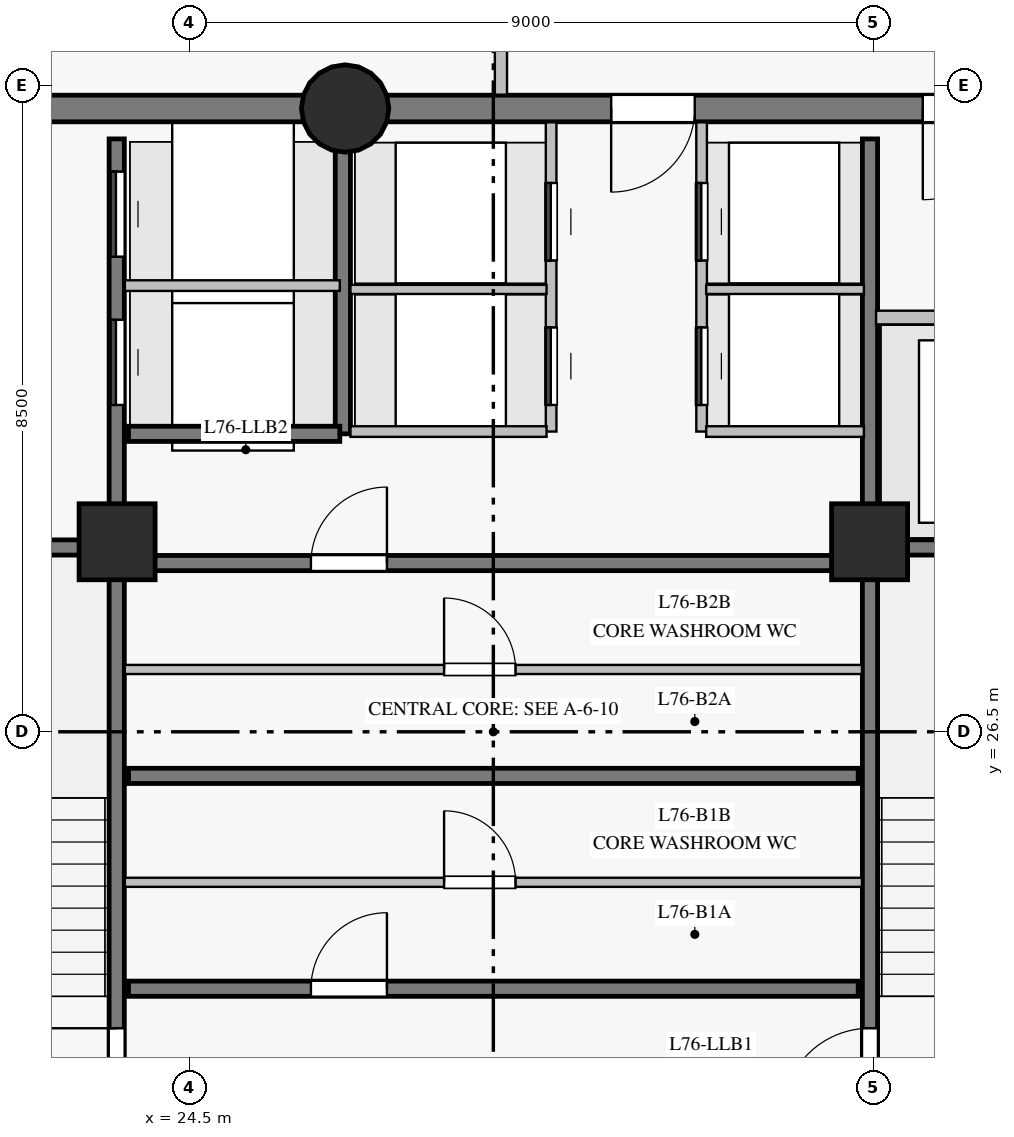
"""IFC4 building model, lengths in metres.
Left out: names, types, materials, properties, quantities, classifications, styles, units other than length and angle.
Written with IfcOpenShell. Run it as: python <this file> out.ifc"""

import sys

from ifc_helpers import new_model, si_unit, direction, frame, frame_2d, origin, origin_with_axes, origin_2d, place, context, subcontext, project, spatial, rectangle, circle, extrude, source, transform, mapped, element, fill, save


model = new_model("IFC4")
c1 = context("Model", 3, precision=1e-05, world=origin(), true_north=direction((0.0, 1.0)))
c2 = subcontext(c1, "Body", "Model", "MODEL_VIEW")
j1 = project(units=[si_unit("LENGTHUNIT", "METRE"), si_unit("PLANEANGLEUNIT", "RADIAN")], contexts=[c1])
p1 = place(None, origin())
s1 = spatial("IfcSite", under=j1, at=p1, CompositionType="ELEMENT")
p2 = place(p1, origin())
s2 = spatial("IfcBuilding", under=s1, at=p2, CompositionType="ELEMENT")
p3 = place(p2, frame((0.0, 0.0, 256.55)))
s3 = spatial("IfcBuildingStorey", under=s2, at=p3, CompositionType="ELEMENT", Elevation=256.55)
p4 = place(p3, frame((37.5, 34.7, 0.0), z_axis=(0.0, 0.0, 1.0), x_axis=(-1.0, 0.0, 0.0)))
e1 = element("IfcWall", 1, at=p4, inside=s3, PredefinedType="SHEAR", context=c2, shape_type="SweptSolid", body=[
    extrude(rectangle(XDim=10.95, YDim=0.35, at=frame_2d((5.475, 0.0))), origin(), (0.0, 0.0, 1.0), 2.85),
])
p5 = place(p4, frame((2.15, 0.0, 0.0)))
e2 = element("IfcOpeningElement", 2, at=p5, cuts=e1, PredefinedType="OPENING", context=c2, shape_type="SweptSolid", body=[
    extrude(rectangle(XDim=1.2, YDim=2.15, at=frame_2d((0.6, 1.075))), frame((0.0, 0.185, 0.0), z_axis=(0.0, -1.0, 0.0), x_axis=(1.0, 0.0, 0.0)), (0.0, 0.0, 1.0), 0.37),
])
p6 = place(p4, frame((6.35, 0.0, 0.0)))
e3 = element("IfcOpeningElement", 3, at=p6, cuts=e1, PredefinedType="OPENING", context=c2, shape_type="SweptSolid", body=[
    extrude(rectangle(XDim=1.1, YDim=2.15, at=frame_2d((0.55, 1.075))), frame((0.0, 0.185, 0.0), z_axis=(0.0, -1.0, 0.0), x_axis=(1.0, 0.0, 0.0)), (0.0, 0.0, 1.0), 0.37),
])
p7 = place(p3, frame((26.55, 34.7, 0.0), z_axis=(0.0, 0.0, 1.0), x_axis=(-1.0, 0.0, 0.0)))
e4 = element("IfcWall", 4, at=p7, inside=s3, PredefinedType="SHEAR", context=c2, shape_type="SweptSolid", body=[
    extrude(rectangle(XDim=7.05, YDim=0.35, at=frame_2d((3.525, 0.0))), origin(), (0.0, 0.0, 1.0), 2.85),
])
m1 = source(origin_with_axes(), c2, "Body", "SweptSolid", [
    extrude(circle(Radius=0.575, at=origin_2d()), origin(), (0.0, 0.0, 1.0), 3.05),
])
p8 = place(p3, frame((26.55, 34.7, 0.0), z_axis=(0.0, 0.0, 1.0), x_axis=(1.0, 0.0, 0.0)))
e5 = element("IfcColumn", 5, at=p8, inside=s3, PredefinedType="COLUMN", context=c2, shape_type="MappedRepresentation", body=[
    mapped(m1, transform((0.0, 0.0, 0.0), scale=1.0)),
])
m2 = source(origin_with_axes(), c2, "Body", "SweptSolid", [
    extrude(rectangle(XDim=1.0, YDim=1.0, at=origin_2d()), origin(), (0.0, 0.0, 1.0), 3.05),
])
for number, where, z_axis, x_axis in (
    (6, (23.55, 29.0, 0.0), (0.0, 0.0, 1.0), (1.0, 0.0, 0.0)),
    (7, (33.45, 29.0, 0.0), (0.0, 0.0, 1.0), (1.0, 0.0, 0.0)),
):
    element("IfcColumn", number, at=place(p3, frame(where, z_axis=z_axis, x_axis=x_axis)), inside=s3, PredefinedType="COLUMN", context=c2, shape_type="MappedRepresentation", body=[
        mapped(m2, transform((0.0, 0.0, 0.0), scale=1.0)),
    ])
p9 = place(p3, frame((23.545, 18.7, 0.0), z_axis=(0.0, 0.0, 1.0), x_axis=(0.0, 1.0, 0.0)))
e8 = element("IfcWall", 8, at=p9, inside=s3, PredefinedType="SHEAR", context=c2, shape_type="SweptSolid", body=[
    extrude(rectangle(XDim=15.6, YDim=0.2, at=frame_2d((7.8, 0.0))), origin(), (0.0, 0.0, 1.0), 2.85),
])
p10 = place(p9, frame((2.75, 0.0, 0.0)))
e9 = element("IfcOpeningElement", 9, at=p10, cuts=e8, PredefinedType="OPENING", context=c2, shape_type="SweptSolid", body=[
    extrude(rectangle(XDim=1.15, YDim=2.15, at=frame_2d((0.575, 1.075))), frame((0.0, 0.11, 0.0), z_axis=(0.0, -1.0, 0.0), x_axis=(1.0, 0.0, 0.0)), (0.0, 0.0, 1.0), 0.22),
])
p11 = place(p9, frame((0.14, 0.0, 0.0)))
e10 = element("IfcOpeningElement", 10, at=p11, cuts=e8, PredefinedType="OPENING", context=c2, shape_type="SweptSolid", body=[
    extrude(rectangle(XDim=0.88, YDim=2.1, at=frame_2d((0.44, 1.05))), frame((0.0, 0.11, 0.0), z_axis=(0.0, -1.0, 0.0), x_axis=(1.0, 0.0, 0.0)), (0.0, 0.0, 1.0), 0.22),
])
p12 = place(p9, frame((1.36, 0.0, 0.0)))
e11 = element("IfcOpeningElement", 11, at=p12, cuts=e8, PredefinedType="OPENING", context=c2, shape_type="SweptSolid", body=[
    extrude(rectangle(XDim=0.88, YDim=2.1, at=frame_2d((0.44, 1.05))), frame((0.0, 0.11, 0.0), z_axis=(0.0, -1.0, 0.0), x_axis=(1.0, 0.0, 0.0)), (0.0, 0.0, 1.0), 0.22),
])
p13 = place(p9, frame((12.1, 0.0, 0.0)))
e12 = element("IfcOpeningElement", 12, at=p13, cuts=e8, PredefinedType="OPENING", context=c2, shape_type="SweptSolid", body=[
    extrude(rectangle(XDim=1.12, YDim=2.15, at=frame_2d((0.56, 1.075))), frame((0.0, 0.11, 0.0), z_axis=(0.0, -1.0, 0.0), x_axis=(1.0, 0.0, 0.0)), (0.0, 0.0, 1.0), 0.22),
])
p14 = place(p9, frame((14.05, 0.0, 0.0)))
e13 = element("IfcOpeningElement", 13, at=p14, cuts=e8, PredefinedType="OPENING", context=c2, shape_type="SweptSolid", body=[
    extrude(rectangle(XDim=1.12, YDim=2.15, at=frame_2d((0.56, 1.075))), frame((0.0, 0.11, 0.0), z_axis=(0.0, -1.0, 0.0), x_axis=(1.0, 0.0, 0.0)), (0.0, 0.0, 1.0), 0.22),
])
p15 = place(p3, frame((33.455, 18.7, 0.0), z_axis=(0.0, 0.0, 1.0), x_axis=(0.0, 1.0, 0.0)))
e14 = element("IfcWall", 14, at=p15, inside=s3, PredefinedType="SHEAR", context=c2, shape_type="SweptSolid", body=[
    extrude(rectangle(XDim=15.6, YDim=0.2, at=frame_2d((7.8, 0.0))), origin(), (0.0, 0.0, 1.0), 2.85),
])
p16 = place(p15, frame((2.75, 0.0, 0.0)))
e15 = element("IfcOpeningElement", 15, at=p16, cuts=e14, PredefinedType="OPENING", context=c2, shape_type="SweptSolid", body=[
    extrude(rectangle(XDim=1.15, YDim=2.15, at=frame_2d((0.575, 1.075))), frame((0.0, 0.11, 0.0), z_axis=(0.0, -1.0, 0.0), x_axis=(1.0, 0.0, 0.0)), (0.0, 0.0, 1.0), 0.22),
])
p17 = place(p15, frame((0.55, 0.0, 0.0)))
e16 = element("IfcOpeningElement", 16, at=p17, cuts=e14, PredefinedType="OPENING", context=c2, shape_type="SweptSolid", body=[
    extrude(rectangle(XDim=0.94, YDim=2.1, at=frame_2d((0.47, 1.05))), frame((0.0, 0.11, 0.0), z_axis=(0.0, -1.0, 0.0), x_axis=(1.0, 0.0, 0.0)), (0.0, 0.0, 1.0), 0.22),
])
p18 = place(p3, frame((23.7, 23.12, 0.0), z_axis=(0.0, 0.0, 1.0), x_axis=(1.0, 0.0, 0.0)))
e17 = element("IfcWall", 17, at=p18, inside=s3, PredefinedType="SHEAR", context=c2, shape_type="SweptSolid", body=[
    extrude(rectangle(XDim=9.6, YDim=0.2, at=frame_2d((4.8, 0.0))), origin(), (0.0, 0.0, 1.0), 2.85),
])
p19 = place(p18, frame((2.4, 0.0, 0.0)))
e18 = element("IfcOpeningElement", 18, at=p19, cuts=e17, PredefinedType="OPENING", context=c2, shape_type="SweptSolid", body=[
    extrude(rectangle(XDim=1.0, YDim=2.15, at=frame_2d((0.5, 1.075))), frame((0.0, 0.11, 0.0), z_axis=(0.0, -1.0, 0.0), x_axis=(1.0, 0.0, 0.0)), (0.0, 0.0, 1.0), 0.22),
])
p20 = place(p3, frame((23.7, 25.92, 0.0), z_axis=(0.0, 0.0, 1.0), x_axis=(1.0, 0.0, 0.0)))
e19 = element("IfcWall", 19, at=p20, inside=s3, PredefinedType="SHEAR", context=c2, shape_type="SweptSolid", body=[
    extrude(rectangle(XDim=9.6, YDim=0.2, at=frame_2d((4.8, 0.0))), origin(), (0.0, 0.0, 1.0), 2.85),
])
p21 = place(p3, frame((23.7, 28.72, 0.0), z_axis=(0.0, 0.0, 1.0), x_axis=(1.0, 0.0, 0.0)))
e20 = element("IfcWall", 20, at=p21, inside=s3, PredefinedType="SHEAR", context=c2, shape_type="SweptSolid", body=[
    extrude(rectangle(XDim=9.6, YDim=0.2, at=frame_2d((4.8, 0.0))), origin(), (0.0, 0.0, 1.0), 2.85),
])
p22 = place(p21, frame((2.4, 0.0, 0.0)))
e21 = element("IfcOpeningElement", 21, at=p22, cuts=e20, PredefinedType="OPENING", context=c2, shape_type="SweptSolid", body=[
    extrude(rectangle(XDim=1.0, YDim=2.15, at=frame_2d((0.5, 1.075))), frame((0.0, 0.11, 0.0), z_axis=(0.0, -1.0, 0.0), x_axis=(1.0, 0.0, 0.0)), (0.0, 0.0, 1.0), 0.22),
])
for number, where, z_axis, x_axis in (
    (22, (33.455, 28.925, 0.0), (0.0, 0.0, 1.0), (1.0, 0.0, 0.0)),
    (23, (19.55, 28.925, 0.0), (0.0, 0.0, 1.0), (1.0, 0.0, 0.0)),
):
    element("IfcWall", number, at=place(p3, frame(where, z_axis=z_axis, x_axis=x_axis)), inside=s3, PredefinedType="SHEAR", context=c2, shape_type="SweptSolid", body=[
        extrude(rectangle(XDim=3.995, YDim=0.2, at=frame_2d((1.998, 0.0))), origin(), (0.0, 0.0, 1.0), 2.85),
    ])
p23 = place(p3, frame((26.52, 30.42, 0.0), z_axis=(0.0, 0.0, 1.0), x_axis=(0.0, 1.0, 0.0)))
e24 = element("IfcWall", 24, at=p23, inside=s3, PredefinedType="SHEAR", context=c2, shape_type="SweptSolid", body=[
    extrude(rectangle(XDim=3.86, YDim=0.2, at=frame_2d((1.93, 0.0))), origin(), (0.0, 0.0, 1.0), 2.85),
])
p24 = place(p3, frame((23.7, 30.42, 0.0), z_axis=(0.0, 0.0, 1.0), x_axis=(1.0, 0.0, 0.0)))
e25 = element("IfcWall", 25, at=p24, inside=s3, PredefinedType="SHEAR", context=c2, shape_type="SweptSolid", body=[
    extrude(rectangle(XDim=2.78, YDim=0.2, at=frame_2d((1.39, 0.0))), origin(), (0.0, 0.0, 1.0), 2.85),
])
p25 = place(p3, frame((23.652, 24.52, 0.0), z_axis=(0.0, 0.0, 1.0), x_axis=(1.0, 0.0, 0.0)))
e26 = element("IfcWall", 26, at=p25, inside=s3, PredefinedType="PARTITIONING", context=c2, shape_type="SweptSolid", body=[
    extrude(rectangle(XDim=9.698, YDim=0.12, at=frame_2d((4.849, 0.0))), origin(), (0.0, 0.0, 1.0), 2.85),
])
p26 = place(p25, frame((4.2, 0.0, 0.0)))
e27 = element("IfcOpeningElement", 27, at=p26, cuts=e26, PredefinedType="OPENING", context=c2, shape_type="SweptSolid", body=[
    extrude(rectangle(XDim=0.94, YDim=2.1, at=frame_2d((0.47, 1.05))), frame((0.0, 0.07, 0.0), z_axis=(0.0, -1.0, 0.0), x_axis=(1.0, 0.0, 0.0)), (0.0, 0.0, 1.0), 0.14),
])
p27 = place(p3, frame((23.652, 27.32, 0.0), z_axis=(0.0, 0.0, 1.0), x_axis=(1.0, 0.0, 0.0)))
e28 = element("IfcWall", 28, at=p27, inside=s3, PredefinedType="PARTITIONING", context=c2, shape_type="SweptSolid", body=[
    extrude(rectangle(XDim=9.698, YDim=0.12, at=frame_2d((4.849, 0.0))), origin(), (0.0, 0.0, 1.0), 2.85),
])
p28 = place(p27, frame((4.2, 0.0, 0.0)))
e29 = element("IfcOpeningElement", 29, at=p28, cuts=e28, PredefinedType="OPENING", context=c2, shape_type="SweptSolid", body=[
    extrude(rectangle(XDim=0.94, YDim=2.1, at=frame_2d((0.47, 1.05))), frame((0.0, 0.07, 0.0), z_axis=(0.0, -1.0, 0.0), x_axis=(1.0, 0.0, 0.0)), (0.0, 0.0, 1.0), 0.14),
])
p29 = place(p3, frame((29.26, 30.45, 0.0), z_axis=(0.0, 0.0, 1.0), x_axis=(0.0, 1.0, 0.0)))
e30 = element("IfcWall", 30, at=p29, inside=s3, PredefinedType="PARTITIONING", context=c2, shape_type="SweptSolid", body=[
    extrude(rectangle(XDim=4.068, YDim=0.14, at=frame_2d((2.034, 0.0))), origin(), (0.0, 0.0, 1.0), 2.85),
])
p30 = place(p29, frame((0.35, 0.0, 0.0)))
e31 = element("IfcOpeningElement", 31, at=p30, cuts=e30, PredefinedType="OPENING", context=c2, shape_type="SweptSolid", body=[
    extrude(rectangle(XDim=1.02, YDim=2.15, at=frame_2d((0.51, 1.075))), frame((0.0, 0.08, 0.0), z_axis=(0.0, -1.0, 0.0), x_axis=(1.0, 0.0, 0.0)), (0.0, 0.0, 1.0), 0.16),
])
p31 = place(p29, frame((2.25, 0.0, 0.0)))
e32 = element("IfcOpeningElement", 32, at=p31, cuts=e30, PredefinedType="OPENING", context=c2, shape_type="SweptSolid", body=[
    extrude(rectangle(XDim=1.02, YDim=2.15, at=frame_2d((0.51, 1.075))), frame((0.0, 0.08, 0.0), z_axis=(0.0, -1.0, 0.0), x_axis=(1.0, 0.0, 0.0)), (0.0, 0.0, 1.0), 0.16),
])
p32 = place(p3, frame((31.24, 30.45, 0.0), z_axis=(0.0, 0.0, 1.0), x_axis=(0.0, 1.0, 0.0)))
e33 = element("IfcWall", 33, at=p32, inside=s3, PredefinedType="PARTITIONING", context=c2, shape_type="SweptSolid", body=[
    extrude(rectangle(XDim=4.068, YDim=0.14, at=frame_2d((2.034, 0.0))), origin(), (0.0, 0.0, 1.0), 2.85),
])
p33 = place(p32, frame((0.35, 0.0, 0.0)))
e34 = element("IfcOpeningElement", 34, at=p33, cuts=e33, PredefinedType="OPENING", context=c2, shape_type="SweptSolid", body=[
    extrude(rectangle(XDim=1.02, YDim=2.15, at=frame_2d((0.51, 1.075))), frame((0.0, 0.08, 0.0), z_axis=(0.0, -1.0, 0.0), x_axis=(1.0, 0.0, 0.0)), (0.0, 0.0, 1.0), 0.16),
])
p34 = place(p32, frame((2.25, 0.0, 0.0)))
e35 = element("IfcOpeningElement", 35, at=p34, cuts=e33, PredefinedType="OPENING", context=c2, shape_type="SweptSolid", body=[
    extrude(rectangle(XDim=1.02, YDim=2.15, at=frame_2d((0.51, 1.075))), frame((0.0, 0.08, 0.0), z_axis=(0.0, -1.0, 0.0), x_axis=(1.0, 0.0, 0.0)), (0.0, 0.0, 1.0), 0.16),
])
p35 = place(p3, frame((33.535, 31.95, 0.0), z_axis=(0.0, 0.0, 1.0), x_axis=(1.0, 0.0, 0.0)))
e36 = element("IfcWall", 36, at=p35, inside=s3, PredefinedType="PARTITIONING", context=c2, shape_type="SweptSolid", body=[
    extrude(rectangle(XDim=3.784, YDim=0.18, at=frame_2d((1.892, 0.0))), origin(), (0.0, 0.0, 1.0), 2.85),
])
p36 = place(p35, frame((0.9, 0.0, 0.0)))
e37 = element("IfcOpeningElement", 37, at=p36, cuts=e36, PredefinedType="OPENING", context=c2, shape_type="SweptSolid", body=[
    extrude(rectangle(XDim=1.3, YDim=2.2, at=frame_2d((0.65, 1.1))), frame((0.0, 0.1, 0.0), z_axis=(0.0, -1.0, 0.0), x_axis=(1.0, 0.0, 0.0)), (0.0, 0.0, 1.0), 0.2),
])
p37 = place(p3, frame((23.652, 32.37, 0.0), z_axis=(0.0, 0.0, 1.0), x_axis=(1.0, 0.0, 0.0)))
e38 = element("IfcWall", 38, at=p37, inside=s3, PredefinedType="PARTITIONING", context=c2, shape_type="SweptSolid", body=[
    extrude(rectangle(XDim=2.828, YDim=0.14, at=frame_2d((1.414, 0.0))), origin(), (0.0, 0.0, 1.0), 2.85),
])
p38 = place(p3, frame((26.62, 30.45, 0.0), z_axis=(0.0, 0.0, 1.0), x_axis=(1.0, 0.0, 0.0)))
e39 = element("IfcWall", 39, at=p38, inside=s3, PredefinedType="PARTITIONING", context=c2, shape_type="SweptSolid", body=[
    extrude(rectangle(XDim=2.58, YDim=0.14, at=frame_2d((1.29, 0.0))), origin(), (0.0, 0.0, 1.0), 2.85),
])
p39 = place(p3, frame((26.62, 32.32, 0.0), z_axis=(0.0, 0.0, 1.0), x_axis=(1.0, 0.0, 0.0)))
e40 = element("IfcWall", 40, at=p39, inside=s3, PredefinedType="PARTITIONING", context=c2, shape_type="SweptSolid", body=[
    extrude(rectangle(XDim=2.58, YDim=0.12, at=frame_2d((1.29, 0.0))), origin(), (0.0, 0.0, 1.0), 2.85),
])
p40 = place(p3, frame((31.3, 30.45, 0.0), z_axis=(0.0, 0.0, 1.0), x_axis=(1.0, 0.0, 0.0)))
e41 = element("IfcWall", 41, at=p40, inside=s3, PredefinedType="PARTITIONING", context=c2, shape_type="SweptSolid", body=[
    extrude(rectangle(XDim=2.075, YDim=0.14, at=frame_2d((1.038, 0.0))), origin(), (0.0, 0.0, 1.0), 2.85),
])
p41 = place(p3, frame((31.3, 32.32, 0.0), z_axis=(0.0, 0.0, 1.0), x_axis=(1.0, 0.0, 0.0)))
e42 = element("IfcWall", 42, at=p41, inside=s3, PredefinedType="PARTITIONING", context=c2, shape_type="SweptSolid", body=[
    extrude(rectangle(XDim=2.075, YDim=0.12, at=frame_2d((1.038, 0.0))), origin(), (0.0, 0.0, 1.0), 2.85),
])
p42 = place(p3, frame((28.6, 34.882, 0.0), z_axis=(0.0, 0.0, 1.0), x_axis=(0.0, 1.0, 0.0)))
e43 = element("IfcWall", 43, at=p42, inside=s3, PredefinedType="PARTITIONING", context=c2, shape_type="SweptSolid", body=[
    extrude(rectangle(XDim=1.518, YDim=0.16, at=frame_2d((0.759, 0.0))), origin(), (0.0, 0.0, 1.0), 2.85),
])
m3 = source(origin_with_axes(), c2, "Body", "SweptSolid", [
    extrude(rectangle(XDim=1.15, YDim=2.15, at=frame_2d((0.575, 1.075))), frame((0.0, 0.025, 0.0), z_axis=(0.0, -1.0, 0.0), x_axis=(1.0, 0.0, 0.0)), (0.0, 0.0, 1.0), 0.05),
])
p43 = place(p10, origin())
e44 = element("IfcDoor", 44, at=p43, inside=s3, OperationType="SINGLE_SWING_RIGHT", PredefinedType="DOOR", context=c2, shape_type="MappedRepresentation", body=[
    mapped(m3, transform((0.0, 0.0, 0.0), scale=1.0)),
])
fill(e9, e44)
p44 = place(p16, origin())
e45 = element("IfcDoor", 45, at=p44, inside=s3, OperationType="SINGLE_SWING_LEFT", PredefinedType="DOOR", context=c2, shape_type="MappedRepresentation", body=[
    mapped(m3, transform((0.0, 0.0, 0.0), scale=1.0)),
])
fill(e15, e45)
m4 = source(origin_with_axes(), c2, "Body", "SweptSolid", [
    extrude(rectangle(XDim=1.2, YDim=2.15, at=frame_2d((0.6, 1.075))), frame((0.0, 0.025, 0.0), z_axis=(0.0, -1.0, 0.0), x_axis=(1.0, 0.0, 0.0)), (0.0, 0.0, 1.0), 0.05),
])
p45 = place(p5, origin())
e46 = element("IfcDoor", 46, at=p45, inside=s3, OperationType="SINGLE_SWING_RIGHT", PredefinedType="DOOR", context=c2, shape_type="MappedRepresentation", body=[
    mapped(m4, transform((0.0, 0.0, 0.0), scale=1.0)),
])
fill(e2, e46)
m5 = source(origin_with_axes(), c2, "Body", "SweptSolid", [
    extrude(rectangle(XDim=1.0, YDim=2.15, at=frame_2d((0.5, 1.075))), frame((0.0, 0.025, 0.0), z_axis=(0.0, -1.0, 0.0), x_axis=(1.0, 0.0, 0.0)), (0.0, 0.0, 1.0), 0.05),
])
p46 = place(p19, origin())
e47 = element("IfcDoor", 47, at=p46, inside=s3, OperationType="SINGLE_SWING_RIGHT", PredefinedType="DOOR", context=c2, shape_type="MappedRepresentation", body=[
    mapped(m5, transform((0.0, 0.0, 0.0), scale=1.0)),
])
fill(e18, e47)
m6 = source(origin_with_axes(), c2, "Body", "SweptSolid", [
    extrude(rectangle(XDim=0.94, YDim=2.1, at=frame_2d((0.47, 1.05))), frame((0.0, 0.025, 0.0), z_axis=(0.0, -1.0, 0.0), x_axis=(1.0, 0.0, 0.0)), (0.0, 0.0, 1.0), 0.05),
])
p47 = place(p26, origin())
e48 = element("IfcDoor", 48, at=p47, inside=s3, OperationType="SINGLE_SWING_LEFT", PredefinedType="DOOR", context=c2, shape_type="MappedRepresentation", body=[
    mapped(m6, transform((0.0, 0.0, 0.0), scale=1.0)),
])
fill(e27, e48)
p48 = place(p22, origin())
e49 = element("IfcDoor", 49, at=p48, inside=s3, OperationType="SINGLE_SWING_RIGHT", PredefinedType="DOOR", context=c2, shape_type="MappedRepresentation", body=[
    mapped(m5, transform((0.0, 0.0, 0.0), scale=1.0)),
])
fill(e21, e49)
p49 = place(p28, origin())
e50 = element("IfcDoor", 50, at=p49, inside=s3, OperationType="SINGLE_SWING_LEFT", PredefinedType="DOOR", context=c2, shape_type="MappedRepresentation", body=[
    mapped(m6, transform((0.0, 0.0, 0.0), scale=1.0)),
])
fill(e29, e50)
m7 = source(origin_with_axes(), c2, "Body", "SweptSolid", [
    extrude(rectangle(XDim=1.1, YDim=2.15, at=frame_2d((0.55, 1.075))), frame((0.0, 0.025, 0.0), z_axis=(0.0, -1.0, 0.0), x_axis=(1.0, 0.0, 0.0)), (0.0, 0.0, 1.0), 0.05),
])
p50 = place(p6, origin())
e51 = element("IfcDoor", 51, at=p50, inside=s3, OperationType="SINGLE_SWING_RIGHT", PredefinedType="DOOR", context=c2, shape_type="MappedRepresentation", body=[
    mapped(m7, transform((0.0, 0.0, 0.0), scale=1.0)),
])
fill(e3, e51)
m8 = source(origin_with_axes(), c2, "Body", "SweptSolid", [
    extrude(rectangle(XDim=1.12, YDim=2.15, at=frame_2d((0.56, 1.075))), frame((0.0, 0.025, 0.0), z_axis=(0.0, -1.0, 0.0), x_axis=(1.0, 0.0, 0.0)), (0.0, 0.0, 1.0), 0.05),
])
p51 = place(p13, origin())
e52 = element("IfcDoor", 52, at=p51, inside=s3, OperationType="SLIDING_TO_LEFT", PredefinedType="DOOR", context=c2, shape_type="MappedRepresentation", body=[
    mapped(m8, transform((0.0, 0.0, 0.0), scale=1.0)),
])
fill(e12, e52)
p52 = place(p14, origin())
e53 = element("IfcDoor", 53, at=p52, inside=s3, OperationType="SLIDING_TO_RIGHT", PredefinedType="DOOR", context=c2, shape_type="MappedRepresentation", body=[
    mapped(m8, transform((0.0, 0.0, 0.0), scale=1.0)),
])
fill(e13, e53)
m9 = source(origin_with_axes(), c2, "Body", "SweptSolid", [
    extrude(rectangle(XDim=1.02, YDim=2.15, at=frame_2d((0.51, 1.075))), frame((0.0, 0.025, 0.0), z_axis=(0.0, -1.0, 0.0), x_axis=(1.0, 0.0, 0.0)), (0.0, 0.0, 1.0), 0.05),
])
p53 = place(p30, origin())
e54 = element("IfcDoor", 54, at=p53, inside=s3, OperationType="SLIDING_TO_LEFT", PredefinedType="DOOR", context=c2, shape_type="MappedRepresentation", body=[
    mapped(m9, transform((0.0, 0.0, 0.0), scale=1.0)),
])
fill(e31, e54)
p54 = place(p31, origin())
e55 = element("IfcDoor", 55, at=p54, inside=s3, OperationType="SLIDING_TO_LEFT", PredefinedType="DOOR", context=c2, shape_type="MappedRepresentation", body=[
    mapped(m9, transform((0.0, 0.0, 0.0), scale=1.0)),
])
fill(e32, e55)
p55 = place(p33, origin())
e56 = element("IfcDoor", 56, at=p55, inside=s3, OperationType="SLIDING_TO_LEFT", PredefinedType="DOOR", context=c2, shape_type="MappedRepresentation", body=[
    mapped(m9, transform((0.0, 0.0, 0.0), scale=1.0)),
])
fill(e34, e56)
p56 = place(p34, origin())
e57 = element("IfcDoor", 57, at=p56, inside=s3, OperationType="SLIDING_TO_LEFT", PredefinedType="DOOR", context=c2, shape_type="MappedRepresentation", body=[
    mapped(m9, transform((0.0, 0.0, 0.0), scale=1.0)),
])
fill(e35, e57)
save(model, sys.argv[1])
